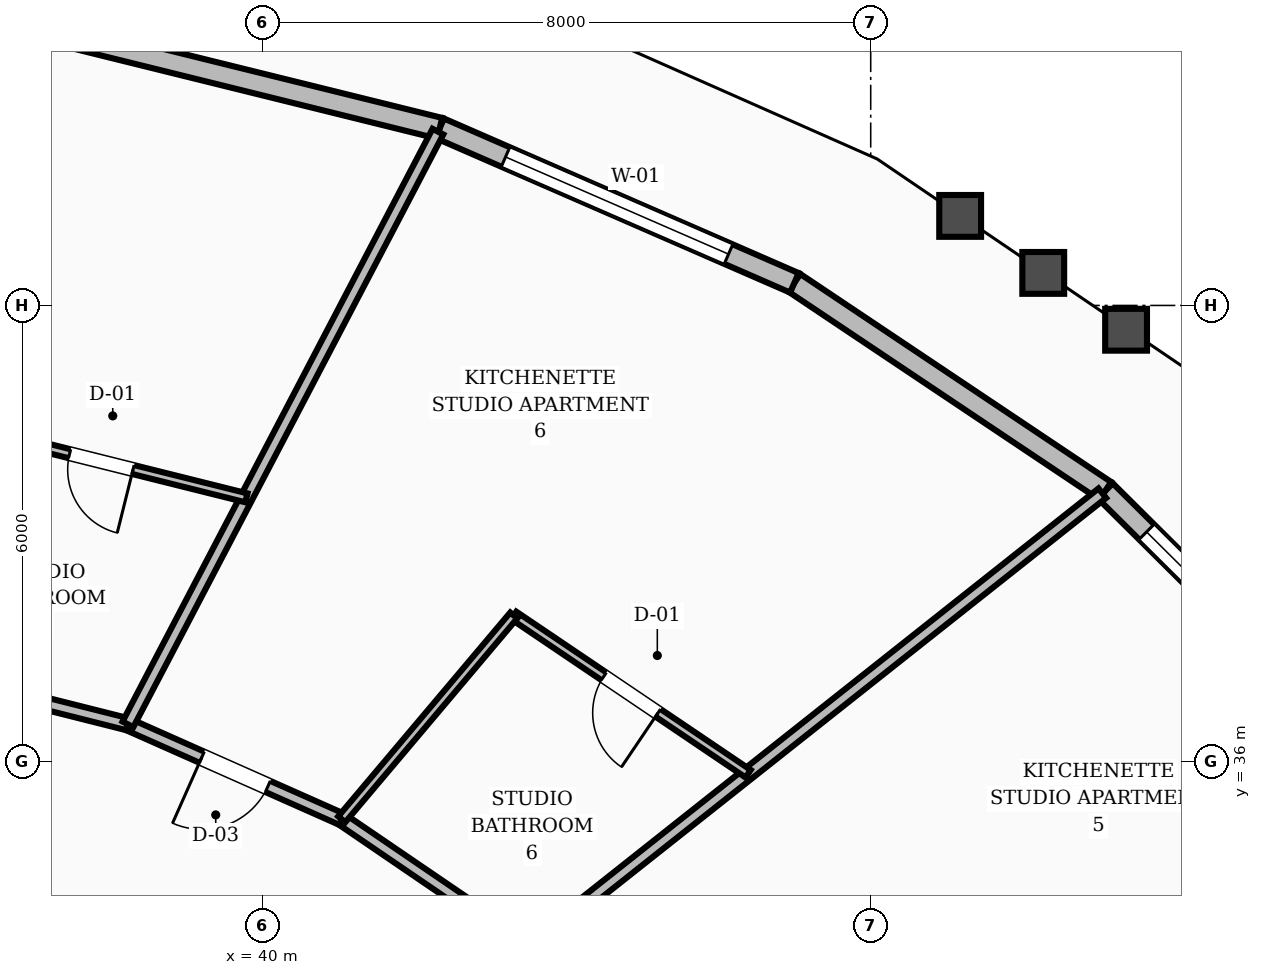
"""IFC4 building model, lengths in metres.
Left out: names, types, materials, properties, quantities, classifications, styles, units other than length and angle.
Written with IfcOpenShell. Run it as: python <this file> out.ifc"""

import sys

from ifc_helpers import new_model, si_unit, direction, frame, frame_2d, origin, place, context, subcontext, project, spatial, rectangle, extrude, element, fill, save


model = new_model("IFC4")
c1 = context("Model", 3, precision=1e-05, world=origin(), true_north=direction((0.0, 1.0)))
c2 = subcontext(c1, "Body", "Model", "MODEL_VIEW")
j1 = project(units=[si_unit("LENGTHUNIT", "METRE"), si_unit("PLANEANGLEUNIT", "RADIAN")], contexts=[c1])
p1 = place(None, origin())
s1 = spatial("IfcSite", under=j1, at=p1, CompositionType="ELEMENT")
p2 = place(p1, origin())
s2 = spatial("IfcBuilding", under=s1, at=p2, CompositionType="ELEMENT")
p3 = place(p2, frame((0.0, 0.0, 88.0)))
s3 = spatial("IfcBuildingStorey", under=s2, at=p3, CompositionType="ELEMENT", Elevation=88.0)
p4 = place(p3, frame((54.443, 36.226, 0.0), z_axis=(0.0, 0.0, 1.0), x_axis=(-0.709450520297, 0.704755247763, 0.0)))
e1 = element("IfcWall", 1, at=p4, inside=s3, PredefinedType="STANDARD", context=c2, shape_type="SweptSolid", body=[
    extrude(rectangle(XDim=4.732, YDim=0.28, at=frame_2d((2.366, 0.0))), origin(), (0.0, 0.0, 1.0), 2.71),
])
p5 = place(p4, frame((0.766, 0.0, 0.8)))
e2 = element("IfcOpeningElement", 2, at=p5, cuts=e1, PredefinedType="OPENING", context=c2, shape_type="SweptSolid", body=[
    extrude(rectangle(XDim=3.2, YDim=1.65, at=frame_2d((1.6, 0.825))), frame((0.0, 0.15, 0.0), z_axis=(0.0, -1.0, 0.0), x_axis=(1.0, 0.0, 0.0)), (0.0, 0.0, 1.0), 0.3),
])
p6 = place(p3, frame((51.086, 39.561, 0.0), z_axis=(0.0, 0.0, 1.0), x_axis=(-0.831102692713, 0.556118974829, 0.0)))
e3 = element("IfcWall", 3, at=p6, inside=s3, PredefinedType="STANDARD", context=c2, shape_type="SweptSolid", body=[
    extrude(rectangle(XDim=4.921, YDim=0.28, at=frame_2d((2.461, 0.0))), origin(), (0.0, 0.0, 1.0), 2.71),
])
p7 = place(p3, frame((46.996, 42.298, 0.0), z_axis=(0.0, 0.0, 1.0), x_axis=(-0.916744158445, 0.399474840205, 0.0)))
e4 = element("IfcWall", 4, at=p7, inside=s3, PredefinedType="STANDARD", context=c2, shape_type="SweptSolid", body=[
    extrude(rectangle(XDim=5.09, YDim=0.28, at=frame_2d((2.545, 0.0))), origin(), (0.0, 0.0, 1.0), 2.71),
])
p8 = place(p7, frame((0.945, 0.0, 0.8)))
e5 = element("IfcOpeningElement", 5, at=p8, cuts=e4, PredefinedType="OPENING", context=c2, shape_type="SweptSolid", body=[
    extrude(rectangle(XDim=3.2, YDim=1.65, at=frame_2d((1.6, 0.825))), frame((0.0, 0.15, 0.0), z_axis=(0.0, -1.0, 0.0), x_axis=(1.0, 0.0, 0.0)), (0.0, 0.0, 1.0), 0.3),
])
p9 = place(p3, frame((42.329, 44.331, 0.0), z_axis=(0.0, 0.0, 1.0), x_axis=(-0.970745192344, 0.240111997913, 0.0)))
e6 = element("IfcWall", 6, at=p9, inside=s3, PredefinedType="STANDARD", context=c2, shape_type="SweptSolid", body=[
    extrude(rectangle(XDim=5.216, YDim=0.28, at=frame_2d((2.608, 0.0))), origin(), (0.0, 0.0, 1.0), 2.71),
])
p10 = place(p3, frame((43.508, 33.559, 0.0), z_axis=(0.0, 0.0, 1.0), x_axis=(-0.826293096206, 0.56324037423, 0.0)))
e7 = element("IfcWall", 7, at=p10, inside=s3, PredefinedType="SOLIDWALL", context=c2, shape_type="SweptSolid", body=[
    extrude(rectangle(XDim=2.985, YDim=0.16, at=frame_2d((1.492, 0.0))), origin(), (0.0, 0.0, 1.0), 2.71),
])
p11 = place(p3, frame((41.041, 35.24, 0.0), z_axis=(0.0, 0.0, 1.0), x_axis=(-0.913952123493, 0.405822024984, 0.0)))
e8 = element("IfcWall", 8, at=p11, inside=s3, PredefinedType="SOLIDWALL", context=c2, shape_type="SweptSolid", body=[
    extrude(rectangle(XDim=3.078, YDim=0.16, at=frame_2d((1.539, 0.0))), origin(), (0.0, 0.0, 1.0), 2.71),
])
p12 = place(p11, frame((1.064, 0.0, 0.0)))
e9 = element("IfcOpeningElement", 9, at=p12, cuts=e8, PredefinedType="OPENING", context=c2, shape_type="SweptSolid", body=[
    extrude(rectangle(XDim=0.95, YDim=2.1, at=frame_2d((0.475, 1.05))), frame((0.0, 0.09, 0.0), z_axis=(0.0, -1.0, 0.0), x_axis=(1.0, 0.0, 0.0)), (0.0, 0.0, 1.0), 0.18),
])
p13 = place(p3, frame((38.228, 36.489, 0.0), z_axis=(0.0, 0.0, 1.0), x_axis=(-0.969689238064, 0.244341526521, 0.0)))
e10 = element("IfcWall", 10, at=p13, inside=s3, PredefinedType="SOLIDWALL", context=c2, shape_type="SweptSolid", body=[
    extrude(rectangle(XDim=3.148, YDim=0.16, at=frame_2d((1.574, 0.0))), origin(), (0.0, 0.0, 1.0), 2.71),
])
p14 = place(p3, frame((43.508, 33.559, 0.0), z_axis=(0.0, 0.0, 1.0), x_axis=(0.783915576776, 0.620867432298, 0.0)))
e11 = element("IfcWall", 11, at=p14, inside=s3, PredefinedType="SOLIDWALL", context=c2, shape_type="SweptSolid", body=[
    extrude(rectangle(XDim=9.617, YDim=0.16, at=frame_2d((4.809, 0.0))), origin(), (0.0, 0.0, 1.0), 2.71),
])
p15 = place(p3, frame((46.387, 35.84, 0.0), z_axis=(0.0, 0.0, 1.0), x_axis=(-0.828744435989, 0.559627250781, 0.0)))
e12 = element("IfcWall", 12, at=p15, inside=s3, PredefinedType="PARTITIONING", context=c2, shape_type="SweptSolid", body=[
    extrude(rectangle(XDim=3.72, YDim=0.12, at=frame_2d((1.86, 0.0))), origin(), (0.0, 0.0, 1.0), 2.71),
])
p16 = place(p15, frame((1.43, 0.0, 0.0)))
e13 = element("IfcOpeningElement", 13, at=p16, cuts=e12, PredefinedType="OPENING", context=c2, shape_type="SweptSolid", body=[
    extrude(rectangle(XDim=0.86, YDim=2.1, at=frame_2d((0.43, 1.05))), frame((0.0, 0.07, 0.0), z_axis=(0.0, -1.0, 0.0), x_axis=(1.0, 0.0, 0.0)), (0.0, 0.0, 1.0), 0.14),
])
p17 = place(p3, frame((41.041, 35.24, 0.0), z_axis=(0.0, 0.0, 1.0), x_axis=(0.644846806951, 0.764311844449, 0.0)))
e14 = element("IfcWall", 14, at=p17, inside=s3, PredefinedType="PARTITIONING", context=c2, shape_type="SweptSolid", body=[
    extrude(rectangle(XDim=3.509, YDim=0.12, at=frame_2d((1.754, 0.0))), origin(), (0.0, 0.0, 1.0), 2.71),
])
p18 = place(p3, frame((38.228, 36.489, 0.0), z_axis=(0.0, 0.0, 1.0), x_axis=(0.463452284004, 0.886121876748, 0.0)))
e15 = element("IfcWall", 15, at=p18, inside=s3, PredefinedType="SOLIDWALL", context=c2, shape_type="SweptSolid", body=[
    extrude(rectangle(XDim=8.8, YDim=0.16, at=frame_2d((4.4, 0.0))), origin(), (0.0, 0.0, 1.0), 2.71),
])
p19 = place(p3, frame((39.786, 39.469, 0.0), z_axis=(0.0, 0.0, 1.0), x_axis=(-0.970222757972, 0.242214367684, 0.0)))
e16 = element("IfcWall", 16, at=p19, inside=s3, PredefinedType="PARTITIONING", context=c2, shape_type="SweptSolid", body=[
    extrude(rectangle(XDim=3.934, YDim=0.12, at=frame_2d((1.967, 0.0))), origin(), (0.0, 0.0, 1.0), 2.71),
])
p20 = place(p19, frame((1.537, 0.0, 0.0)))
e17 = element("IfcOpeningElement", 17, at=p20, cuts=e16, PredefinedType="OPENING", context=c2, shape_type="SweptSolid", body=[
    extrude(rectangle(XDim=0.86, YDim=2.1, at=frame_2d((0.43, 1.05))), frame((0.0, 0.07, 0.0), z_axis=(0.0, -1.0, 0.0), x_axis=(1.0, 0.0, 0.0)), (0.0, 0.0, 1.0), 0.14),
])
p21 = place(p5, origin())
e18 = element("IfcWindow", 18, at=p21, inside=s3, PartitioningType="SINGLE_PANEL", PredefinedType="WINDOW", context=c2, shape_type="SweptSolid", body=[
    extrude(rectangle(XDim=3.2, YDim=1.65, at=frame_2d((1.6, 0.825))), frame((0.0, 0.03, 0.0), z_axis=(0.0, -1.0, 0.0), x_axis=(1.0, 0.0, 0.0)), (0.0, 0.0, 1.0), 0.06),
])
fill(e2, e18)
p22 = place(p8, origin())
e19 = element("IfcWindow", 19, at=p22, inside=s3, PartitioningType="SINGLE_PANEL", PredefinedType="WINDOW", context=c2, shape_type="SweptSolid", body=[
    extrude(rectangle(XDim=3.2, YDim=1.65, at=frame_2d((1.6, 0.825))), frame((0.0, 0.03, 0.0), z_axis=(0.0, -1.0, 0.0), x_axis=(1.0, 0.0, 0.0)), (0.0, 0.0, 1.0), 0.06),
])
fill(e5, e19)
p23 = place(p16, origin())
e20 = element("IfcDoor", 20, at=p23, inside=s3, OperationType="SINGLE_SWING_LEFT", PredefinedType="DOOR", context=c2, shape_type="SweptSolid", body=[
    extrude(rectangle(XDim=0.86, YDim=2.1, at=frame_2d((0.43, 1.05))), frame((0.0, 0.025, 0.0), z_axis=(0.0, -1.0, 0.0), x_axis=(1.0, 0.0, 0.0)), (0.0, 0.0, 1.0), 0.05),
])
fill(e13, e20)
p24 = place(p12, origin())
e21 = element("IfcDoor", 21, at=p24, inside=s3, OperationType="SINGLE_SWING_RIGHT", PredefinedType="DOOR", context=c2, shape_type="SweptSolid", body=[
    extrude(rectangle(XDim=0.95, YDim=2.1, at=frame_2d((0.475, 1.05))), frame((0.0, 0.025, 0.0), z_axis=(0.0, -1.0, 0.0), x_axis=(1.0, 0.0, 0.0)), (0.0, 0.0, 1.0), 0.05),
])
fill(e9, e21)
p25 = place(p20, origin())
e22 = element("IfcDoor", 22, at=p25, inside=s3, OperationType="SINGLE_SWING_LEFT", PredefinedType="DOOR", context=c2, shape_type="SweptSolid", body=[
    extrude(rectangle(XDim=0.86, YDim=2.1, at=frame_2d((0.43, 1.05))), frame((0.0, 0.025, 0.0), z_axis=(0.0, -1.0, 0.0), x_axis=(1.0, 0.0, 0.0)), (0.0, 0.0, 1.0), 0.05),
])
fill(e17, e22)
save(model, sys.argv[1])
